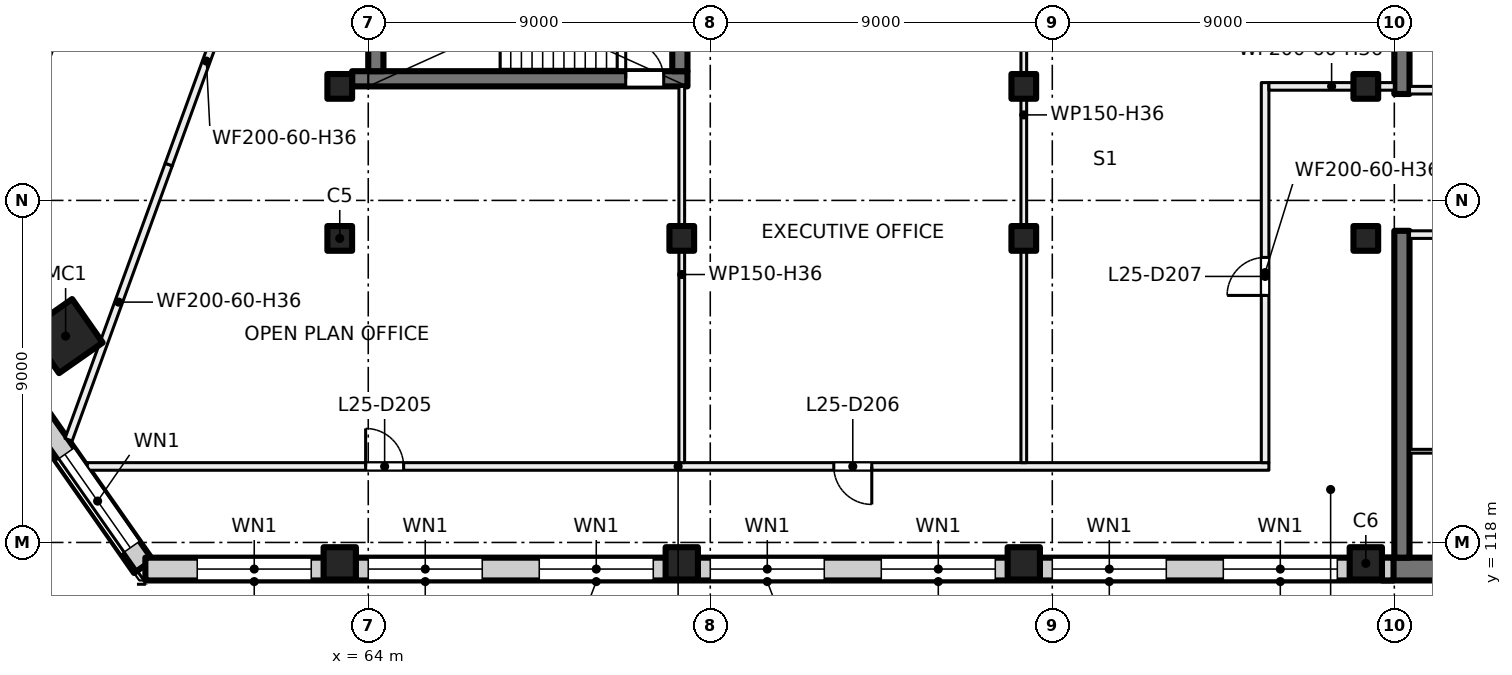
"""IFC4 building model, lengths in metres.
Left out: names, types, materials, properties, quantities, classifications, styles, units other than length and angle.
Written with IfcOpenShell. Run it as: python <this file> out.ifc"""

import sys

from ifc_helpers import new_model, si_unit, direction, frame, frame_2d, origin, origin_2d, place, context, subcontext, project, spatial, rectangle, hollow_rectangle, extrude, element, fill, save


model = new_model("IFC4")
c1 = context("Model", 3, precision=1e-05, world=origin(), true_north=direction((0.0, 1.0)))
c2 = subcontext(c1, "Body", "Model", "MODEL_VIEW")
j1 = project(units=[si_unit("LENGTHUNIT", "METRE"), si_unit("PLANEANGLEUNIT", "RADIAN")], contexts=[c1])
p1 = place(None, origin())
s1 = spatial("IfcSite", under=j1, at=p1, CompositionType="ELEMENT")
p2 = place(p1, origin())
s2 = spatial("IfcBuilding", under=s1, at=p2, CompositionType="ELEMENT")
p3 = place(p2, frame((0.0, 0.0, 109.0)))
s3 = spatial("IfcBuildingStorey", under=s2, at=p3, CompositionType="ELEMENT", Elevation=109.0)
p4 = place(p3, frame((56.036, 123.43, 0.0), z_axis=(0.0, 0.0, 1.0), x_axis=(0.573576436351, -0.819152044289, 0.0)))
e1 = element("IfcColumn", 1, at=p4, inside=s3, PredefinedType="COLUMN", context=c2, shape_type="SweptSolid", body=[
    extrude(hollow_rectangle(XDim=1.4, YDim=1.4, WallThickness=0.04, at=origin_2d()), origin(), (0.0, 0.0, 1.0), 4.0),
])
for number, where, z_axis, x_axis in (
    (2, (63.25, 130.0, 0.0), (0.0, 0.0, 1.0), (1.0, 0.0, 0.0)),
    (3, (81.25, 130.0, 0.0), (0.0, 0.0, 1.0), (1.0, 0.0, 0.0)),
    (4, (90.25, 130.0, 0.0), (0.0, 0.0, 1.0), (1.0, 0.0, 0.0)),
    (5, (63.25, 126.0, 0.0), (0.0, 0.0, 1.0), (1.0, 0.0, 0.0)),
    (6, (72.25, 126.0, 0.0), (0.0, 0.0, 1.0), (1.0, 0.0, 0.0)),
    (7, (81.25, 126.0, 0.0), (0.0, 0.0, 1.0), (1.0, 0.0, 0.0)),
    (8, (90.25, 126.0, 0.0), (0.0, 0.0, 1.0), (1.0, 0.0, 0.0)),
):
    element("IfcColumn", number, at=place(p3, frame(where, z_axis=z_axis, x_axis=x_axis)), inside=s3, PredefinedType="COLUMN", context=c2, shape_type="SweptSolid", body=[
        extrude(rectangle(XDim=0.65, YDim=0.65, at=origin_2d()), origin(), (0.0, 0.0, 1.0), 4.0),
    ])
for number, where, z_axis, x_axis in (
    (9, (63.25, 117.45, 0.0), (0.0, 0.0, 1.0), (1.0, 0.0, 0.0)),
    (10, (72.25, 117.45, 0.0), (0.0, 0.0, 1.0), (1.0, 0.0, 0.0)),
    (11, (81.25, 117.45, 0.0), (0.0, 0.0, 1.0), (1.0, 0.0, 0.0)),
    (12, (90.25, 117.45, 0.0), (0.0, 0.0, 1.0), (1.0, 0.0, 0.0)),
):
    element("IfcColumn", number, at=place(p3, frame(where, z_axis=z_axis, x_axis=x_axis)), inside=s3, PredefinedType="COLUMN", context=c2, shape_type="SweptSolid", body=[
        extrude(rectangle(XDim=0.85, YDim=0.85, at=origin_2d()), origin(), (0.0, 0.0, 1.0), 4.0),
    ])
p5 = place(p3, frame((99.6, 117.3, 0.0), z_axis=(0.0, 0.0, 1.0), x_axis=(-1.0, 0.0, 0.0)))
e13 = element("IfcWall", 13, at=p5, inside=s3, PredefinedType="SHEAR", context=c2, shape_type="SweptSolid", body=[
    extrude(rectangle(XDim=8.925, YDim=0.6, at=frame_2d((4.462, 0.0))), origin(), (0.0, 0.0, 1.0), 4.0),
])
for number, where, z_axis, x_axis in (
    (14, (91.2, 138.4, 0.0), (0.0, 0.0, 1.0), (0.0, -1.0, 0.0)),
    (15, (91.2, 126.2, 0.0), (0.0, 0.0, 1.0), (0.0, -1.0, 0.0)),
):
    element("IfcWall", number, at=place(p3, frame(where, z_axis=z_axis, x_axis=x_axis)), inside=s3, PredefinedType="SHEAR", context=c2, shape_type="SweptSolid", body=[
        extrude(rectangle(XDim=8.6, YDim=0.4, at=frame_2d((4.3, 0.0))), origin(), (0.0, 0.0, 1.0), 4.0),
    ])
p6 = place(p3, frame((63.575, 130.2, 0.0), z_axis=(0.0, 0.0, 1.0), x_axis=(1.0, 0.0, 0.0)))
e16 = element("IfcWall", 16, at=p6, inside=s3, PredefinedType="SHEAR", context=c2, shape_type="SweptSolid", body=[
    extrude(rectangle(XDim=8.825, YDim=0.4, at=frame_2d((4.413, 0.0))), origin(), (0.0, 0.0, 1.0), 4.0),
])
p7 = place(p6, frame((7.2, 0.0, 0.0)))
e17 = element("IfcOpeningElement", 17, at=p7, cuts=e16, PredefinedType="OPENING", context=c2, shape_type="SweptSolid", body=[
    extrude(rectangle(XDim=1.0, YDim=2.1, at=frame_2d((0.5, 1.05))), frame((0.0, 0.21, 0.0), z_axis=(0.0, -1.0, 0.0), x_axis=(1.0, 0.0, 0.0)), (0.0, 0.0, 1.0), 0.42),
])
for number, where, z_axis, x_axis in (
    (18, (64.2, 130.4, 0.0), (0.0, 0.0, 1.0), (0.0, 1.0, 0.0)),
    (19, (72.2, 130.4, 0.0), (0.0, 0.0, 1.0), (0.0, 1.0, 0.0)),
):
    element("IfcWall", number, at=place(p3, frame(where, z_axis=z_axis, x_axis=x_axis)), inside=s3, PredefinedType="SHEAR", context=c2, shape_type="SweptSolid", body=[
        extrude(rectangle(XDim=3.0, YDim=0.4, at=frame_2d((1.5, 0.0))), origin(), (0.0, 0.0, 1.0), 4.0),
    ])
p8 = place(p3, frame((58.083, 117.369, 0.0), z_axis=(0.0, 0.0, 1.0), x_axis=(-0.573573095716, 0.819154383416, 0.0)))
e20 = element("IfcWall", 20, at=p8, inside=s3, PredefinedType="SOLIDWALL", context=c2, shape_type="SweptSolid", body=[
    extrude(rectangle(XDim=26.037, YDim=0.6, at=frame_2d((13.019, 0.0))), origin(), (0.0, 0.0, 1.0), 3.625),
])
p9 = place(p8, frame((0.6, 0.0, 0.9)))
e21 = element("IfcOpeningElement", 21, at=p9, cuts=e20, PredefinedType="OPENING", context=c2, shape_type="SweptSolid", body=[
    extrude(rectangle(XDim=3.0, YDim=2.4, at=frame_2d((1.5, 1.2))), frame((0.0, 0.31, 0.0), z_axis=(0.0, -1.0, 0.0), x_axis=(1.0, 0.0, 0.0)), (0.0, 0.0, 1.0), 0.62),
])
p10 = place(p8, frame((4.829, 0.0, 0.9)))
e22 = element("IfcOpeningElement", 22, at=p10, cuts=e20, PredefinedType="OPENING", context=c2, shape_type="SweptSolid", body=[
    extrude(rectangle(XDim=3.0, YDim=2.4, at=frame_2d((1.5, 1.2))), frame((0.0, 0.31, 0.0), z_axis=(0.0, -1.0, 0.0), x_axis=(1.0, 0.0, 0.0)), (0.0, 0.0, 1.0), 0.62),
])
p11 = place(p8, frame((9.209, 0.0, 0.9)))
e23 = element("IfcOpeningElement", 23, at=p11, cuts=e20, PredefinedType="OPENING", context=c2, shape_type="SweptSolid", body=[
    extrude(rectangle(XDim=3.0, YDim=2.4, at=frame_2d((1.5, 1.2))), frame((0.0, 0.31, 0.0), z_axis=(0.0, -1.0, 0.0), x_axis=(1.0, 0.0, 0.0)), (0.0, 0.0, 1.0), 0.62),
])
p12 = place(p8, frame((13.588, 0.0, 0.9)))
e24 = element("IfcOpeningElement", 24, at=p12, cuts=e20, PredefinedType="OPENING", context=c2, shape_type="SweptSolid", body=[
    extrude(rectangle(XDim=3.0, YDim=2.4, at=frame_2d((1.5, 1.2))), frame((0.0, 0.31, 0.0), z_axis=(0.0, -1.0, 0.0), x_axis=(1.0, 0.0, 0.0)), (0.0, 0.0, 1.0), 0.62),
])
p13 = place(p8, frame((17.968, 0.0, 0.9)))
e25 = element("IfcOpeningElement", 25, at=p13, cuts=e20, PredefinedType="OPENING", context=c2, shape_type="SweptSolid", body=[
    extrude(rectangle(XDim=3.0, YDim=2.4, at=frame_2d((1.5, 1.2))), frame((0.0, 0.31, 0.0), z_axis=(0.0, -1.0, 0.0), x_axis=(1.0, 0.0, 0.0)), (0.0, 0.0, 1.0), 0.62),
])
p14 = place(p8, frame((22.198, 0.0, 0.9)))
e26 = element("IfcOpeningElement", 26, at=p14, cuts=e20, PredefinedType="OPENING", context=c2, shape_type="SweptSolid", body=[
    extrude(rectangle(XDim=3.0, YDim=2.4, at=frame_2d((1.5, 1.2))), frame((0.0, 0.31, 0.0), z_axis=(0.0, -1.0, 0.0), x_axis=(1.0, 0.0, 0.0)), (0.0, 0.0, 1.0), 0.62),
])
p15 = place(p3, frame((90.98, 117.3, 0.0), z_axis=(0.0, 0.0, 1.0), x_axis=(-1.0, 0.0, 0.0)))
e27 = element("IfcWall", 27, at=p15, inside=s3, PredefinedType="SOLIDWALL", context=c2, shape_type="SweptSolid", body=[
    extrude(rectangle(XDim=32.845, YDim=0.6, at=frame_2d((16.422, 0.0))), origin(), (0.0, 0.0, 1.0), 3.625),
])
p16 = place(p15, frame((1.48, 0.0, 0.9)))
e28 = element("IfcOpeningElement", 28, at=p16, cuts=e27, PredefinedType="OPENING", context=c2, shape_type="SweptSolid", body=[
    extrude(rectangle(XDim=3.0, YDim=2.4, at=frame_2d((1.5, 1.2))), frame((0.0, 0.31, 0.0), z_axis=(0.0, -1.0, 0.0), x_axis=(1.0, 0.0, 0.0)), (0.0, 0.0, 1.0), 0.62),
])
p17 = place(p15, frame((5.98, 0.0, 0.9)))
e29 = element("IfcOpeningElement", 29, at=p17, cuts=e27, PredefinedType="OPENING", context=c2, shape_type="SweptSolid", body=[
    extrude(rectangle(XDim=3.0, YDim=2.4, at=frame_2d((1.5, 1.2))), frame((0.0, 0.31, 0.0), z_axis=(0.0, -1.0, 0.0), x_axis=(1.0, 0.0, 0.0)), (0.0, 0.0, 1.0), 0.62),
])
p18 = place(p15, frame((10.48, 0.0, 0.9)))
e30 = element("IfcOpeningElement", 30, at=p18, cuts=e27, PredefinedType="OPENING", context=c2, shape_type="SweptSolid", body=[
    extrude(rectangle(XDim=3.0, YDim=2.4, at=frame_2d((1.5, 1.2))), frame((0.0, 0.31, 0.0), z_axis=(0.0, -1.0, 0.0), x_axis=(1.0, 0.0, 0.0)), (0.0, 0.0, 1.0), 0.62),
])
p19 = place(p15, frame((14.98, 0.0, 0.9)))
e31 = element("IfcOpeningElement", 31, at=p19, cuts=e27, PredefinedType="OPENING", context=c2, shape_type="SweptSolid", body=[
    extrude(rectangle(XDim=3.0, YDim=2.4, at=frame_2d((1.5, 1.2))), frame((0.0, 0.31, 0.0), z_axis=(0.0, -1.0, 0.0), x_axis=(1.0, 0.0, 0.0)), (0.0, 0.0, 1.0), 0.62),
])
p20 = place(p15, frame((19.48, 0.0, 0.9)))
e32 = element("IfcOpeningElement", 32, at=p20, cuts=e27, PredefinedType="OPENING", context=c2, shape_type="SweptSolid", body=[
    extrude(rectangle(XDim=3.0, YDim=2.4, at=frame_2d((1.5, 1.2))), frame((0.0, 0.31, 0.0), z_axis=(0.0, -1.0, 0.0), x_axis=(1.0, 0.0, 0.0)), (0.0, 0.0, 1.0), 0.62),
])
p21 = place(p15, frame((23.98, 0.0, 0.9)))
e33 = element("IfcOpeningElement", 33, at=p21, cuts=e27, PredefinedType="OPENING", context=c2, shape_type="SweptSolid", body=[
    extrude(rectangle(XDim=3.0, YDim=2.4, at=frame_2d((1.5, 1.2))), frame((0.0, 0.31, 0.0), z_axis=(0.0, -1.0, 0.0), x_axis=(1.0, 0.0, 0.0)), (0.0, 0.0, 1.0), 0.62),
])
p22 = place(p15, frame((28.48, 0.0, 0.9)))
e34 = element("IfcOpeningElement", 34, at=p22, cuts=e27, PredefinedType="OPENING", context=c2, shape_type="SweptSolid", body=[
    extrude(rectangle(XDim=3.0, YDim=2.4, at=frame_2d((1.5, 1.2))), frame((0.0, 0.31, 0.0), z_axis=(0.0, -1.0, 0.0), x_axis=(1.0, 0.0, 0.0)), (0.0, 0.0, 1.0), 0.62),
])
p23 = place(p3, frame((95.2, 126.1, 0.0), z_axis=(0.0, 0.0, 1.0), x_axis=(-1.0, 0.0, 0.0)))
e35 = element("IfcWall", 35, at=p23, inside=s3, PredefinedType="PARTITIONING", context=c2, shape_type="SweptSolid", body=[
    extrude(rectangle(XDim=3.8, YDim=0.2, at=frame_2d((1.9, 0.0))), origin(), (0.0, 0.0, 1.0), 3.625),
])
p24 = place(p23, frame((0.3, 0.0, 0.0)))
e36 = element("IfcOpeningElement", 36, at=p24, cuts=e35, PredefinedType="OPENING", context=c2, shape_type="SweptSolid", body=[
    extrude(rectangle(XDim=1.2, YDim=2.1, at=frame_2d((0.6, 1.05))), frame((0.0, 0.11, 0.0), z_axis=(0.0, -1.0, 0.0), x_axis=(1.0, 0.0, 0.0)), (0.0, 0.0, 1.0), 0.22),
])
p25 = place(p3, frame((93.35, 120.4, 0.0), z_axis=(0.0, 0.0, 1.0), x_axis=(-1.0, 0.0, 0.0)))
e37 = element("IfcWall", 37, at=p25, inside=s3, PredefinedType="PARTITIONING", context=c2, shape_type="SweptSolid", body=[
    extrude(rectangle(XDim=1.95, YDim=0.1, at=frame_2d((0.975, 0.0))), origin(), (0.0, 0.0, 1.0), 3.625),
])
p26 = place(p3, frame((91.4, 129.9, 0.0), z_axis=(0.0, 0.0, 1.0), x_axis=(1.0, 0.0, 0.0)))
e38 = element("IfcWall", 38, at=p26, inside=s3, PredefinedType="PARTITIONING", context=c2, shape_type="SweptSolid", body=[
    extrude(rectangle(XDim=3.8, YDim=0.2, at=frame_2d((1.9, 0.0))), origin(), (0.0, 0.0, 1.0), 3.625),
])
p27 = place(p26, frame((2.3, 0.0, 0.0)))
e39 = element("IfcOpeningElement", 39, at=p27, cuts=e38, PredefinedType="OPENING", context=c2, shape_type="SweptSolid", body=[
    extrude(rectangle(XDim=1.2, YDim=2.1, at=frame_2d((0.6, 1.05))), frame((0.0, 0.11, 0.0), z_axis=(0.0, -1.0, 0.0), x_axis=(1.0, 0.0, 0.0)), (0.0, 0.0, 1.0), 0.22),
])
p28 = place(p3, frame((53.314, 124.703, 0.0), z_axis=(0.0, 0.0, 1.0), x_axis=(0.341964791562, 0.939712765334, 0.0)))
e40 = element("IfcWall", 40, at=p28, inside=s3, PredefinedType="PARTITIONING", context=c2, shape_type="SweptSolid", body=[
    extrude(rectangle(XDim=10.697, YDim=0.2, at=frame_2d((5.348, 0.0))), origin(), (0.0, 0.0, 1.0), 3.625),
])
p29 = place(p3, frame((56.114, 120.704, 0.0), z_axis=(0.0, 0.0, 1.0), x_axis=(0.342117026932, 0.939657352381, 0.0)))
e41 = element("IfcWall", 41, at=p29, inside=s3, PredefinedType="PARTITIONING", context=c2, shape_type="SweptSolid", body=[
    extrude(rectangle(XDim=7.705, YDim=0.2, at=frame_2d((3.853, 0.0))), origin(), (0.0, 0.0, 1.0), 3.625),
])
p30 = place(p3, frame((56.607, 120.0, 0.0), z_axis=(0.0, 0.0, 1.0), x_axis=(1.0, 0.0, 0.0)))
e42 = element("IfcWall", 42, at=p30, inside=s3, PredefinedType="PARTITIONING", context=c2, shape_type="SweptSolid", body=[
    extrude(rectangle(XDim=31.093, YDim=0.2, at=frame_2d((15.546, 0.0))), origin(), (0.0, 0.0, 1.0), 3.625),
])
p31 = place(p30, frame((7.324, 0.0, 0.0)))
e43 = element("IfcOpeningElement", 43, at=p31, cuts=e42, PredefinedType="OPENING", context=c2, shape_type="SweptSolid", body=[
    extrude(rectangle(XDim=1.0, YDim=2.1, at=frame_2d((0.5, 1.05))), frame((0.0, 0.11, 0.0), z_axis=(0.0, -1.0, 0.0), x_axis=(1.0, 0.0, 0.0)), (0.0, 0.0, 1.0), 0.22),
])
p32 = place(p30, frame((19.643, 0.0, 0.0)))
e44 = element("IfcOpeningElement", 44, at=p32, cuts=e42, PredefinedType="OPENING", context=c2, shape_type="SweptSolid", body=[
    extrude(rectangle(XDim=1.0, YDim=2.1, at=frame_2d((0.5, 1.05))), frame((0.0, 0.11, 0.0), z_axis=(0.0, -1.0, 0.0), x_axis=(1.0, 0.0, 0.0)), (0.0, 0.0, 1.0), 0.22),
])
p33 = place(p3, frame((58.75, 127.944, 0.0), z_axis=(0.0, 0.0, 1.0), x_axis=(0.342007027005, 0.939697394633, 0.0)))
e45 = element("IfcWall", 45, at=p33, inside=s3, PredefinedType="PARTITIONING", context=c2, shape_type="SweptSolid", body=[
    extrude(rectangle(XDim=5.792, YDim=0.2, at=frame_2d((2.896, 0.0))), origin(), (0.0, 0.0, 1.0), 3.625),
])
p34 = place(p3, frame((72.25, 120.1, 0.0), z_axis=(0.0, 0.0, 1.0), x_axis=(0.0, 1.0, 0.0)))
e46 = element("IfcWall", 46, at=p34, inside=s3, PredefinedType="PARTITIONING", context=c2, shape_type="SweptSolid", body=[
    extrude(rectangle(XDim=9.9, YDim=0.15, at=frame_2d((4.95, 0.0))), origin(), (0.0, 0.0, 1.0), 3.625),
])
p35 = place(p3, frame((81.25, 120.1, 0.0), z_axis=(0.0, 0.0, 1.0), x_axis=(0.0, 1.0, 0.0)))
e47 = element("IfcWall", 47, at=p35, inside=s3, PredefinedType="PARTITIONING", context=c2, shape_type="SweptSolid", body=[
    extrude(rectangle(XDim=18.3, YDim=0.15, at=frame_2d((9.15, 0.0))), origin(), (0.0, 0.0, 1.0), 3.625),
])
p36 = place(p3, frame((87.6, 120.1, 0.0), z_axis=(0.0, 0.0, 1.0), x_axis=(0.0, 1.0, 0.0)))
e48 = element("IfcWall", 48, at=p36, inside=s3, PredefinedType="PARTITIONING", context=c2, shape_type="SweptSolid", body=[
    extrude(rectangle(XDim=10.0, YDim=0.2, at=frame_2d((5.0, 0.0))), origin(), (0.0, 0.0, 1.0), 3.625),
])
p37 = place(p36, frame((4.4, 0.0, 0.0)))
e49 = element("IfcOpeningElement", 49, at=p37, cuts=e48, PredefinedType="OPENING", context=c2, shape_type="SweptSolid", body=[
    extrude(rectangle(XDim=1.0, YDim=2.1, at=frame_2d((0.5, 1.05))), frame((0.0, 0.11, 0.0), z_axis=(0.0, -1.0, 0.0), x_axis=(1.0, 0.0, 0.0)), (0.0, 0.0, 1.0), 0.22),
])
p38 = place(p3, frame((87.7, 130.0, 0.0), z_axis=(0.0, 0.0, 1.0), x_axis=(1.0, 0.0, 0.0)))
e50 = element("IfcWall", 50, at=p38, inside=s3, PredefinedType="PARTITIONING", context=c2, shape_type="SweptSolid", body=[
    extrude(rectangle(XDim=3.3, YDim=0.2, at=frame_2d((1.65, 0.0))), origin(), (0.0, 0.0, 1.0), 3.625),
])
p39 = place(p9, origin())
e51 = element("IfcWindow", 51, at=p39, inside=s3, PartitioningType="SINGLE_PANEL", PredefinedType="WINDOW", context=c2, shape_type="SweptSolid", body=[
    extrude(rectangle(XDim=3.0, YDim=2.4, at=frame_2d((1.5, 1.2))), frame((0.0, 0.03, 0.0), z_axis=(0.0, -1.0, 0.0), x_axis=(1.0, 0.0, 0.0)), (0.0, 0.0, 1.0), 0.06),
])
fill(e21, e51)
p40 = place(p16, origin())
e52 = element("IfcWindow", 52, at=p40, inside=s3, PartitioningType="SINGLE_PANEL", PredefinedType="WINDOW", context=c2, shape_type="SweptSolid", body=[
    extrude(rectangle(XDim=3.0, YDim=2.4, at=frame_2d((1.5, 1.2))), frame((0.0, 0.03, 0.0), z_axis=(0.0, -1.0, 0.0), x_axis=(1.0, 0.0, 0.0)), (0.0, 0.0, 1.0), 0.06),
])
fill(e28, e52)
p41 = place(p17, origin())
e53 = element("IfcWindow", 53, at=p41, inside=s3, PartitioningType="SINGLE_PANEL", PredefinedType="WINDOW", context=c2, shape_type="SweptSolid", body=[
    extrude(rectangle(XDim=3.0, YDim=2.4, at=frame_2d((1.5, 1.2))), frame((0.0, 0.03, 0.0), z_axis=(0.0, -1.0, 0.0), x_axis=(1.0, 0.0, 0.0)), (0.0, 0.0, 1.0), 0.06),
])
fill(e29, e53)
p42 = place(p18, origin())
e54 = element("IfcWindow", 54, at=p42, inside=s3, PartitioningType="SINGLE_PANEL", PredefinedType="WINDOW", context=c2, shape_type="SweptSolid", body=[
    extrude(rectangle(XDim=3.0, YDim=2.4, at=frame_2d((1.5, 1.2))), frame((0.0, 0.03, 0.0), z_axis=(0.0, -1.0, 0.0), x_axis=(1.0, 0.0, 0.0)), (0.0, 0.0, 1.0), 0.06),
])
fill(e30, e54)
p43 = place(p19, origin())
e55 = element("IfcWindow", 55, at=p43, inside=s3, PartitioningType="SINGLE_PANEL", PredefinedType="WINDOW", context=c2, shape_type="SweptSolid", body=[
    extrude(rectangle(XDim=3.0, YDim=2.4, at=frame_2d((1.5, 1.2))), frame((0.0, 0.03, 0.0), z_axis=(0.0, -1.0, 0.0), x_axis=(1.0, 0.0, 0.0)), (0.0, 0.0, 1.0), 0.06),
])
fill(e31, e55)
p44 = place(p20, origin())
e56 = element("IfcWindow", 56, at=p44, inside=s3, PartitioningType="SINGLE_PANEL", PredefinedType="WINDOW", context=c2, shape_type="SweptSolid", body=[
    extrude(rectangle(XDim=3.0, YDim=2.4, at=frame_2d((1.5, 1.2))), frame((0.0, 0.03, 0.0), z_axis=(0.0, -1.0, 0.0), x_axis=(1.0, 0.0, 0.0)), (0.0, 0.0, 1.0), 0.06),
])
fill(e32, e56)
p45 = place(p21, origin())
e57 = element("IfcWindow", 57, at=p45, inside=s3, PartitioningType="SINGLE_PANEL", PredefinedType="WINDOW", context=c2, shape_type="SweptSolid", body=[
    extrude(rectangle(XDim=3.0, YDim=2.4, at=frame_2d((1.5, 1.2))), frame((0.0, 0.03, 0.0), z_axis=(0.0, -1.0, 0.0), x_axis=(1.0, 0.0, 0.0)), (0.0, 0.0, 1.0), 0.06),
])
fill(e33, e57)
p46 = place(p22, origin())
e58 = element("IfcWindow", 58, at=p46, inside=s3, PartitioningType="SINGLE_PANEL", PredefinedType="WINDOW", context=c2, shape_type="SweptSolid", body=[
    extrude(rectangle(XDim=3.0, YDim=2.4, at=frame_2d((1.5, 1.2))), frame((0.0, 0.03, 0.0), z_axis=(0.0, -1.0, 0.0), x_axis=(1.0, 0.0, 0.0)), (0.0, 0.0, 1.0), 0.06),
])
fill(e34, e58)
p47 = place(p7, origin())
e59 = element("IfcDoor", 59, at=p47, inside=s3, OperationType="SINGLE_SWING_LEFT", PredefinedType="DOOR", context=c2, shape_type="SweptSolid", body=[
    extrude(rectangle(XDim=1.0, YDim=2.1, at=frame_2d((0.5, 1.05))), frame((0.0, 0.025, 0.0), z_axis=(0.0, -1.0, 0.0), x_axis=(1.0, 0.0, 0.0)), (0.0, 0.0, 1.0), 0.05),
])
fill(e17, e59)
p48 = place(p31, origin())
e60 = element("IfcDoor", 60, at=p48, inside=s3, OperationType="SINGLE_SWING_LEFT", PredefinedType="DOOR", context=c2, shape_type="SweptSolid", body=[
    extrude(rectangle(XDim=1.0, YDim=2.1, at=frame_2d((0.5, 1.05))), frame((0.0, 0.025, 0.0), z_axis=(0.0, -1.0, 0.0), x_axis=(1.0, 0.0, 0.0)), (0.0, 0.0, 1.0), 0.05),
])
fill(e43, e60)
p49 = place(p32, origin())
e61 = element("IfcDoor", 61, at=p49, inside=s3, OperationType="SINGLE_SWING_RIGHT", PredefinedType="DOOR", context=c2, shape_type="SweptSolid", body=[
    extrude(rectangle(XDim=1.0, YDim=2.1, at=frame_2d((0.5, 1.05))), frame((0.0, 0.025, 0.0), z_axis=(0.0, -1.0, 0.0), x_axis=(1.0, 0.0, 0.0)), (0.0, 0.0, 1.0), 0.05),
])
fill(e44, e61)
p50 = place(p37, origin())
e62 = element("IfcDoor", 62, at=p50, inside=s3, OperationType="SINGLE_SWING_LEFT", PredefinedType="DOOR", context=c2, shape_type="SweptSolid", body=[
    extrude(rectangle(XDim=1.0, YDim=2.1, at=frame_2d((0.5, 1.05))), frame((0.0, 0.025, 0.0), z_axis=(0.0, -1.0, 0.0), x_axis=(1.0, 0.0, 0.0)), (0.0, 0.0, 1.0), 0.05),
])
fill(e49, e62)
save(model, sys.argv[1])
